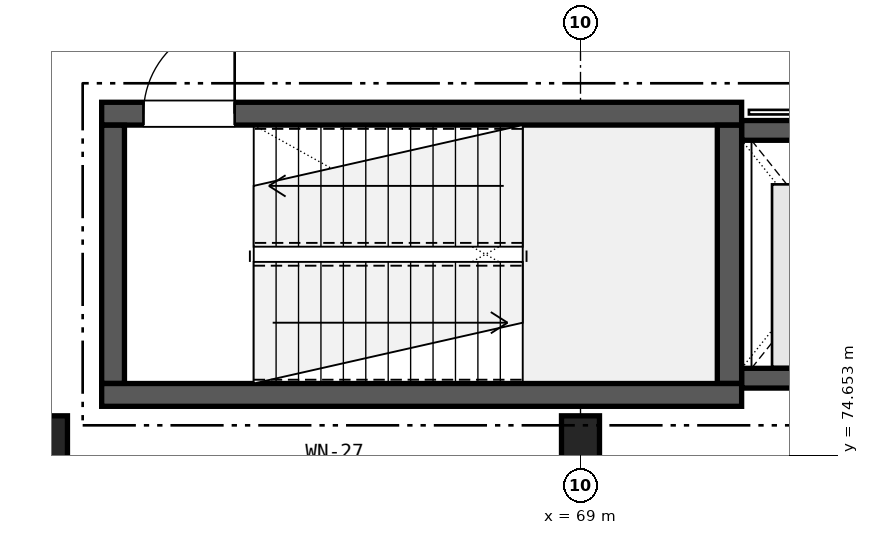
"""IFC4 building model, lengths in metres.
Left out: names, types, materials, properties, quantities, classifications, styles, units other than length and angle.
Written with IfcOpenShell. Run it as: python <this file> out.ifc"""

import sys

from ifc_helpers import new_model, si_unit, direction, frame, frame_2d, origin, origin_2d, place, context, subcontext, project, spatial, rectangle, extrude, element, fill, save


model = new_model("IFC4")
c1 = context("Model", 3, precision=1e-05, world=origin(), true_north=direction((0.0, 1.0)))
c2 = subcontext(c1, "Body", "Model", "MODEL_VIEW")
j1 = project(units=[si_unit("LENGTHUNIT", "METRE"), si_unit("PLANEANGLEUNIT", "RADIAN")], contexts=[c1])
p1 = place(None, origin())
s1 = spatial("IfcSite", under=j1, at=p1, CompositionType="ELEMENT")
p2 = place(p1, origin())
s2 = spatial("IfcBuilding", under=s1, at=p2, CompositionType="ELEMENT")
p3 = place(p2, frame((0.0, 0.0, 5.1)))
s3 = spatial("IfcBuildingStorey", under=s2, at=p3, CompositionType="ELEMENT", Elevation=5.1)
for number, where, z_axis, x_axis in (
    (1, (62.0, 74.8, 0.0), (0.0, 0.0, 1.0), (1.0, 0.0, 0.0)),
    (2, (69.0, 74.8, 0.0), (0.0, 0.0, 1.0), (1.0, 0.0, 0.0)),
):
    element("IfcColumn", number, at=place(p3, frame(where, z_axis=z_axis, x_axis=x_axis)), inside=s3, PredefinedType="COLUMN", context=c2, shape_type="SweptSolid", body=[
        extrude(rectangle(XDim=0.5, YDim=0.75, at=origin_2d()), origin(), (0.0, 0.0, 1.0), 4.42),
    ])
p4 = place(p3, frame((62.7, 75.45, 0.0), z_axis=(0.0, 0.0, 1.0), x_axis=(1.0, 0.0, 0.0)))
e3 = element("IfcWall", 3, at=p4, inside=s3, PredefinedType="SHEAR", context=c2, shape_type="SweptSolid", body=[
    extrude(rectangle(XDim=8.42, YDim=0.3, at=frame_2d((4.21, 0.0))), origin(), (0.0, 0.0, 1.0), 4.145),
])
p5 = place(p3, frame((62.7, 79.15, 0.0), z_axis=(0.0, 0.0, 1.0), x_axis=(1.0, 0.0, 0.0)))
e4 = element("IfcWall", 4, at=p5, inside=s3, PredefinedType="SHEAR", context=c2, shape_type="SweptSolid", body=[
    extrude(rectangle(XDim=8.42, YDim=0.3, at=frame_2d((4.21, 0.0))), origin(), (0.0, 0.0, 1.0), 4.145),
])
p6 = place(p5, frame((0.55, 0.0, 0.0)))
e5 = element("IfcOpeningElement", 5, at=p6, cuts=e4, PredefinedType="OPENING", context=c2, shape_type="SweptSolid", body=[
    extrude(rectangle(XDim=1.2, YDim=2.2, at=frame_2d((0.6, 1.1))), frame((0.0, 0.16, 0.0), z_axis=(0.0, -1.0, 0.0), x_axis=(1.0, 0.0, 0.0)), (0.0, 0.0, 1.0), 0.32),
])
p7 = place(p3, frame((62.85, 75.602, 0.0), z_axis=(0.0, 0.0, 1.0), x_axis=(0.0, 1.0, 0.0)))
e6 = element("IfcWall", 6, at=p7, inside=s3, PredefinedType="SHEAR", context=c2, shape_type="SweptSolid", body=[
    extrude(rectangle(XDim=3.396, YDim=0.3, at=frame_2d((1.698, 0.0))), origin(), (0.0, 0.0, 1.0), 4.145),
])
p8 = place(p3, frame((70.96, 75.602, 0.0), z_axis=(0.0, 0.0, 1.0), x_axis=(0.0, 1.0, 0.0)))
e7 = element("IfcWall", 7, at=p8, inside=s3, PredefinedType="SHEAR", context=c2, shape_type="SweptSolid", body=[
    extrude(rectangle(XDim=3.396, YDim=0.32, at=frame_2d((1.698, 0.0))), origin(), (0.0, 0.0, 1.0), 4.145),
])
p9 = place(p3, frame((71.122, 75.67, 0.0), z_axis=(0.0, 0.0, 1.0), x_axis=(1.0, 0.0, 0.0)))
e8 = element("IfcWall", 8, at=p9, inside=s3, PredefinedType="SHEAR", context=c2, shape_type="SweptSolid", body=[
    extrude(rectangle(XDim=2.658, YDim=0.26, at=frame_2d((1.329, 0.0))), origin(), (0.0, 0.0, 1.0), 4.145),
])
p10 = place(p3, frame((71.122, 78.93, 0.0), z_axis=(0.0, 0.0, 1.0), x_axis=(1.0, 0.0, 0.0)))
e9 = element("IfcWall", 9, at=p10, inside=s3, PredefinedType="SHEAR", context=c2, shape_type="SweptSolid", body=[
    extrude(rectangle(XDim=2.658, YDim=0.26, at=frame_2d((1.329, 0.0))), origin(), (0.0, 0.0, 1.0), 4.145),
])
p11 = place(p10, frame((0.679, 0.0, 0.0)))
e10 = element("IfcOpeningElement", 10, at=p11, cuts=e9, PredefinedType="OPENING", context=c2, shape_type="SweptSolid", body=[
    extrude(rectangle(XDim=1.3, YDim=2.2, at=frame_2d((0.65, 1.1))), frame((0.0, 0.14, 0.0), z_axis=(0.0, -1.0, 0.0), x_axis=(1.0, 0.0, 0.0)), (0.0, 0.0, 1.0), 0.28),
])
p12 = place(p6, origin())
e11 = element("IfcDoor", 11, at=p12, inside=s3, OperationType="SINGLE_SWING_RIGHT", PredefinedType="DOOR", context=c2, shape_type="SweptSolid", body=[
    extrude(rectangle(XDim=1.2, YDim=2.2, at=frame_2d((0.6, 1.1))), frame((0.0, 0.025, 0.0), z_axis=(0.0, -1.0, 0.0), x_axis=(1.0, 0.0, 0.0)), (0.0, 0.0, 1.0), 0.05),
])
fill(e5, e11)
save(model, sys.argv[1])
